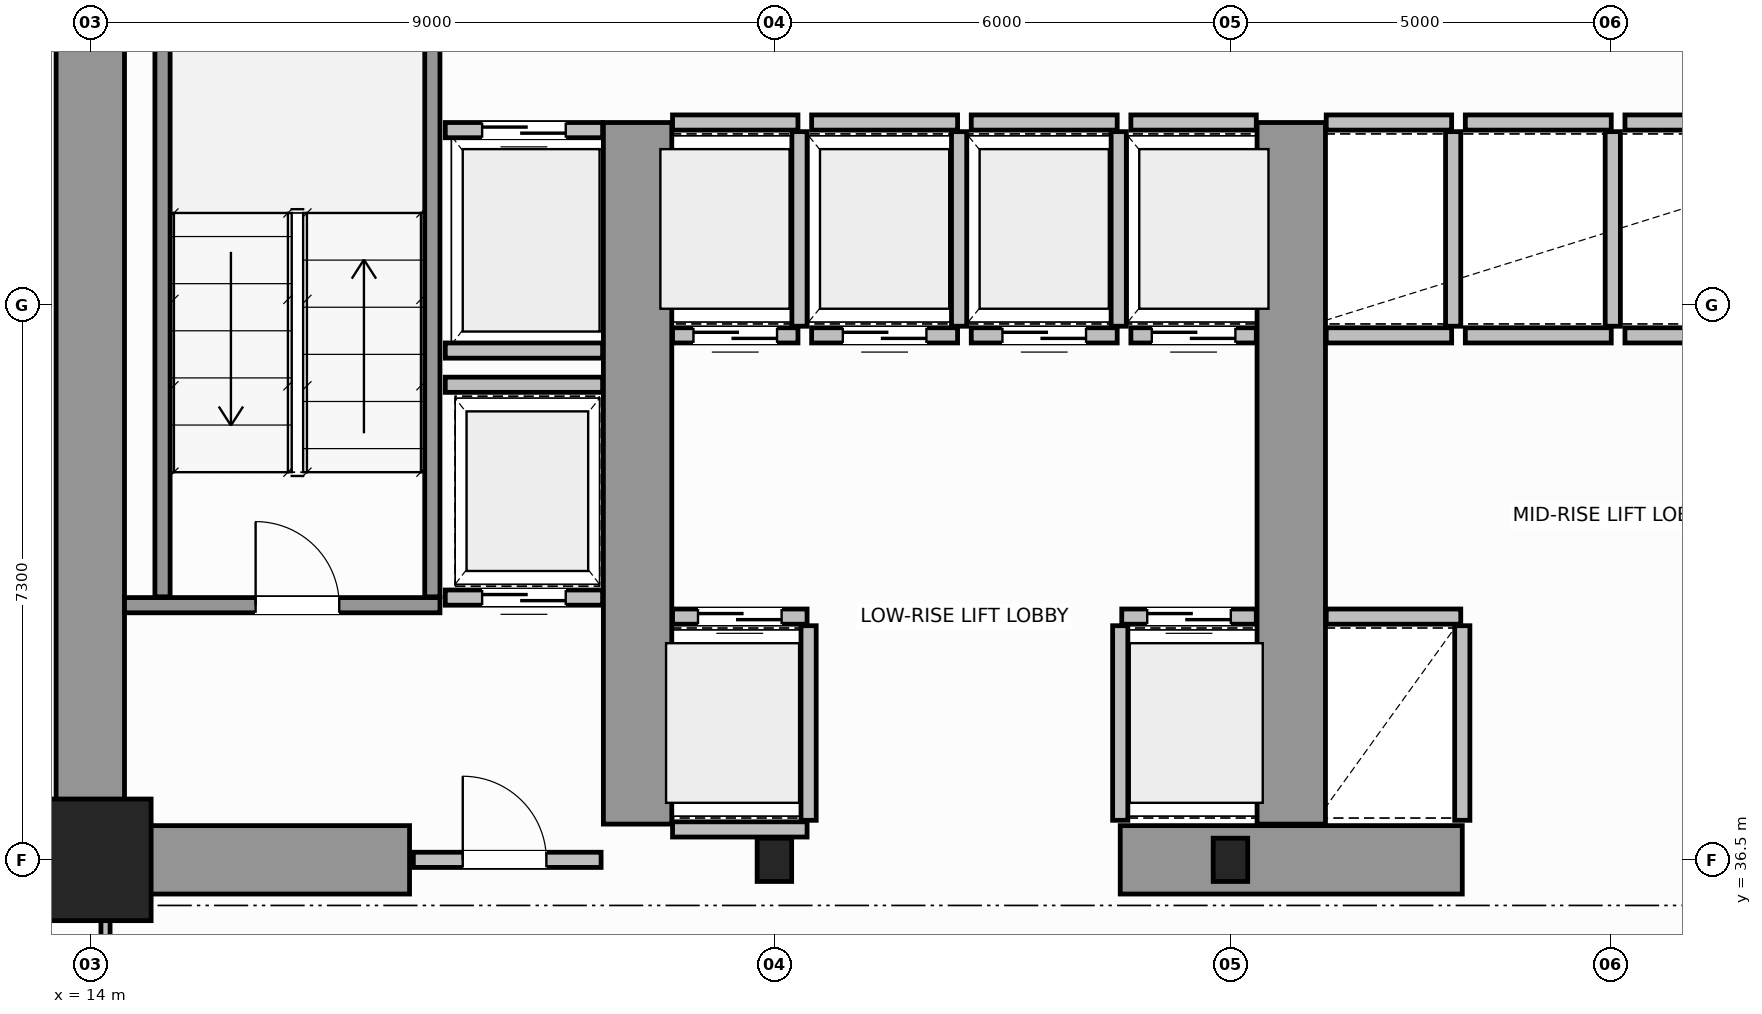
"""IFC4 building model, lengths in metres.
Left out: names, types, materials, properties, quantities, classifications, styles, units other than length and angle.
Written with IfcOpenShell. Run it as: python <this file> out.ifc"""

import sys

from ifc_helpers import new_model, si_unit, direction, frame, frame_2d, origin, origin_2d, place, context, subcontext, project, spatial, rectangle, i_section, extrude, source, transform, mapped, element, fill, save


model = new_model("IFC4")
c1 = context("Model", 3, precision=1e-05, world=origin(), true_north=direction((0.0, 1.0)))
c2 = subcontext(c1, "Body", "Model", "MODEL_VIEW")
j1 = project(units=[si_unit("LENGTHUNIT", "METRE"), si_unit("PLANEANGLEUNIT", "RADIAN")], contexts=[c1])
p1 = place(None, origin())
s1 = spatial("IfcSite", under=j1, at=p1, CompositionType="ELEMENT")
p2 = place(p1, origin())
s2 = spatial("IfcBuilding", under=s1, at=p2, CompositionType="ELEMENT")
p3 = place(p2, frame((0.0, 0.0, 49.2)))
s3 = spatial("IfcBuildingStorey", under=s2, at=p3, CompositionType="ELEMENT", Elevation=49.2)
m1 = source(origin(), c2, "Body", "SweptSolid", [
    extrude(rectangle(XDim=1.6, YDim=1.6, at=origin_2d()), origin(), (0.0, 0.0, 1.0), 3.8),
])
p4 = place(p3, frame((14.0, 36.5, 0.0), z_axis=(0.0, 0.0, 1.0), x_axis=(1.0, 0.0, 0.0)))
e1 = element("IfcColumn", 1, at=p4, inside=s3, PredefinedType="COLUMN", context=c2, shape_type="MappedRepresentation", body=[
    mapped(m1, transform((0.0, 0.0, 0.0), scale=1.0)),
])
m2 = source(origin(), c2, "Body", "SweptSolid", [
    extrude(i_section(OverallWidth=0.454, OverallDepth=0.569, WebThickness=0.078, FlangeThickness=0.08, FilletRadius=0.015, at=origin_2d()), origin(), (0.0, 0.0, 1.0), 3.8),
])
for number, where, z_axis, x_axis in (
    (2, (23.0, 36.5, 0.0), (0.0, 0.0, 1.0), (1.0, 0.0, 0.0)),
    (3, (29.0, 36.5, 0.0), (0.0, 0.0, 1.0), (1.0, 0.0, 0.0)),
):
    element("IfcColumn", number, at=place(p3, frame(where, z_axis=z_axis, x_axis=x_axis)), inside=s3, PredefinedType="COLUMN", context=c2, shape_type="MappedRepresentation", body=[
        mapped(m2, transform((0.0, 0.0, 0.0), scale=1.0)),
    ])
p5 = place(p3, frame((14.0, 36.5, 0.0), z_axis=(0.0, 0.0, 1.0), x_axis=(0.0, 1.0, 0.0)))
e4 = element("IfcWall", 4, at=p5, inside=s3, PredefinedType="SHEAR", context=c2, shape_type="SweptSolid", body=[
    extrude(rectangle(XDim=14.5, YDim=0.9, at=frame_2d((7.25, 0.0))), origin(), (0.0, 0.0, 1.0), 3.8),
])
p6 = place(p3, frame((14.47, 36.5, 0.0), z_axis=(0.0, 0.0, 1.0), x_axis=(1.0, 0.0, 0.0)))
e5 = element("IfcWall", 5, at=p6, inside=s3, PredefinedType="SHEAR", context=c2, shape_type="SweptSolid", body=[
    extrude(rectangle(XDim=3.73, YDim=0.9, at=frame_2d((1.865, 0.0))), origin(), (0.0, 0.0, 1.0), 2.38),
])
p7 = place(p3, frame((27.55, 36.5, 0.0), z_axis=(0.0, 0.0, 1.0), x_axis=(1.0, 0.0, 0.0)))
e6 = element("IfcWall", 6, at=p7, inside=s3, PredefinedType="SHEAR", context=c2, shape_type="SweptSolid", body=[
    extrude(rectangle(XDim=4.5, YDim=0.9, at=frame_2d((2.25, 0.0))), origin(), (0.0, 0.0, 1.0), 3.8),
])
for number, where, z_axis, x_axis in (
    (7, (21.2, 36.97, 0.0), (0.0, 0.0, 1.0), (0.0, 1.0, 0.0)),
    (8, (29.8, 36.97, 0.0), (0.0, 0.0, 1.0), (0.0, 1.0, 0.0)),
):
    element("IfcWall", number, at=place(p3, frame(where, z_axis=z_axis, x_axis=x_axis)), inside=s3, PredefinedType="SHEAR", context=c2, shape_type="SweptSolid", body=[
        extrude(rectangle(XDim=9.23, YDim=0.9, at=frame_2d((4.615, 0.0))), origin(), (0.0, 0.0, 1.0), 3.8),
    ])
p8 = place(p3, frame((14.45, 39.85, 0.0), z_axis=(0.0, 0.0, 1.0), x_axis=(1.0, 0.0, 0.0)))
e9 = element("IfcWall", 9, at=p8, inside=s3, PredefinedType="SOLIDWALL", context=c2, shape_type="SweptSolid", body=[
    extrude(rectangle(XDim=4.15, YDim=0.2, at=frame_2d((2.075, 0.0))), origin(), (0.0, 0.0, 1.0), 3.8),
])
p9 = place(p8, frame((1.725, 0.0, 0.0)))
e10 = element("IfcOpeningElement", 10, at=p9, cuts=e9, PredefinedType="OPENING", context=c2, shape_type="SweptSolid", body=[
    extrude(rectangle(XDim=1.1, YDim=2.15, at=frame_2d((0.55, 1.075))), frame((0.0, 0.11, 0.0), z_axis=(0.0, -1.0, 0.0), x_axis=(1.0, 0.0, 0.0)), (0.0, 0.0, 1.0), 0.22),
])
for number, where, z_axis, x_axis in (
    (11, (14.95, 39.96, 0.0), (0.0, 0.0, 1.0), (0.0, 1.0, 0.0)),
    (12, (18.5, 39.96, 0.0), (0.0, 0.0, 1.0), (0.0, 1.0, 0.0)),
):
    element("IfcWall", number, at=place(p3, frame(where, z_axis=z_axis, x_axis=x_axis)), inside=s3, PredefinedType="SOLIDWALL", context=c2, shape_type="SweptSolid", body=[
        extrude(rectangle(XDim=9.93, YDim=0.2, at=frame_2d((4.965, 0.0))), origin(), (0.0, 0.0, 1.0), 3.8),
    ])
p10 = place(p3, frame((18.25, 36.5, 0.0), z_axis=(0.0, 0.0, 1.0), x_axis=(1.0, 0.0, 0.0)))
e13 = element("IfcWall", 13, at=p10, inside=s3, PredefinedType="SOLIDWALL", context=c2, shape_type="SweptSolid", body=[
    extrude(rectangle(XDim=2.47, YDim=0.2, at=frame_2d((1.235, 0.0))), origin(), (0.0, 0.0, 1.0), 2.37),
])
p11 = place(p10, frame((0.65, 0.0, 0.0)))
e14 = element("IfcOpeningElement", 14, at=p11, cuts=e13, PredefinedType="OPENING", context=c2, shape_type="SweptSolid", body=[
    extrude(rectangle(XDim=1.1, YDim=2.15, at=frame_2d((0.55, 1.075))), frame((0.0, 0.11, 0.0), z_axis=(0.0, -1.0, 0.0), x_axis=(1.0, 0.0, 0.0)), (0.0, 0.0, 1.0), 0.22),
])
p12 = place(p3, frame((21.66, 39.7, 0.0), z_axis=(0.0, 0.0, 1.0), x_axis=(1.0, 0.0, 0.0)))
e15 = element("IfcWall", 15, at=p12, inside=s3, PredefinedType="SOLIDWALL", context=c2, shape_type="SweptSolid", body=[
    extrude(rectangle(XDim=1.77, YDim=0.2, at=frame_2d((0.885, 0.0))), origin(), (0.0, 0.0, 1.0), 3.58),
])
p13 = place(p12, frame((0.335, 0.0, 0.0)))
e16 = element("IfcOpeningElement", 16, at=p13, cuts=e15, PredefinedType="OPENING", context=c2, shape_type="SweptSolid", body=[
    extrude(rectangle(XDim=1.1, YDim=2.15, at=frame_2d((0.55, 1.075))), frame((0.0, 0.11, 0.0), z_axis=(0.0, -1.0, 0.0), x_axis=(1.0, 0.0, 0.0)), (0.0, 0.0, 1.0), 0.22),
])
p14 = place(p3, frame((21.66, 36.9, 0.0), z_axis=(0.0, 0.0, 1.0), x_axis=(1.0, 0.0, 0.0)))
e17 = element("IfcWall", 17, at=p14, inside=s3, PredefinedType="SOLIDWALL", context=c2, shape_type="SweptSolid", body=[
    extrude(rectangle(XDim=1.77, YDim=0.2, at=frame_2d((0.885, 0.0))), origin(), (0.0, 0.0, 1.0), 2.37),
])
p15 = place(p3, frame((23.45, 37.02, 0.0), z_axis=(0.0, 0.0, 1.0), x_axis=(0.0, 1.0, 0.0)))
e18 = element("IfcWall", 18, at=p15, inside=s3, PredefinedType="SOLIDWALL", context=c2, shape_type="SweptSolid", body=[
    extrude(rectangle(XDim=2.56, YDim=0.2, at=frame_2d((1.28, 0.0))), origin(), (0.0, 0.0, 1.0), 3.58),
])
p16 = place(p3, frame((27.57, 39.7, 0.0), z_axis=(0.0, 0.0, 1.0), x_axis=(1.0, 0.0, 0.0)))
e19 = element("IfcWall", 19, at=p16, inside=s3, PredefinedType="SOLIDWALL", context=c2, shape_type="SweptSolid", body=[
    extrude(rectangle(XDim=1.77, YDim=0.2, at=frame_2d((0.885, 0.0))), origin(), (0.0, 0.0, 1.0), 3.58),
])
p17 = place(p16, frame((0.335, 0.0, 0.0)))
e20 = element("IfcOpeningElement", 20, at=p17, cuts=e19, PredefinedType="OPENING", context=c2, shape_type="SweptSolid", body=[
    extrude(rectangle(XDim=1.1, YDim=2.15, at=frame_2d((0.55, 1.075))), frame((0.0, 0.11, 0.0), z_axis=(0.0, -1.0, 0.0), x_axis=(1.0, 0.0, 0.0)), (0.0, 0.0, 1.0), 0.22),
])
p18 = place(p3, frame((27.55, 37.02, 0.0), z_axis=(0.0, 0.0, 1.0), x_axis=(0.0, 1.0, 0.0)))
e21 = element("IfcWall", 21, at=p18, inside=s3, PredefinedType="SOLIDWALL", context=c2, shape_type="SweptSolid", body=[
    extrude(rectangle(XDim=2.56, YDim=0.2, at=frame_2d((1.28, 0.0))), origin(), (0.0, 0.0, 1.0), 3.58),
])
p19 = place(p3, frame((21.66, 43.4, 0.0), z_axis=(0.0, 0.0, 1.0), x_axis=(1.0, 0.0, 0.0)))
e22 = element("IfcWall", 22, at=p19, inside=s3, PredefinedType="SOLIDWALL", context=c2, shape_type="SweptSolid", body=[
    extrude(rectangle(XDim=1.65, YDim=0.2, at=frame_2d((0.825, 0.0))), origin(), (0.0, 0.0, 1.0), 3.58),
])
p20 = place(p19, frame((0.275, 0.0, 0.0)))
e23 = element("IfcOpeningElement", 23, at=p20, cuts=e22, PredefinedType="OPENING", context=c2, shape_type="SweptSolid", body=[
    extrude(rectangle(XDim=1.1, YDim=2.15, at=frame_2d((0.55, 1.075))), frame((0.0, 0.11, 0.0), z_axis=(0.0, -1.0, 0.0), x_axis=(1.0, 0.0, 0.0)), (0.0, 0.0, 1.0), 0.22),
])
p21 = place(p3, frame((21.66, 46.2, 0.0), z_axis=(0.0, 0.0, 1.0), x_axis=(1.0, 0.0, 0.0)))
e24 = element("IfcWall", 24, at=p21, inside=s3, PredefinedType="SOLIDWALL", context=c2, shape_type="SweptSolid", body=[
    extrude(rectangle(XDim=1.65, YDim=0.2, at=frame_2d((0.825, 0.0))), origin(), (0.0, 0.0, 1.0), 3.58),
])
p22 = place(p3, frame((23.33, 43.52, 0.0), z_axis=(0.0, 0.0, 1.0), x_axis=(0.0, 1.0, 0.0)))
e25 = element("IfcWall", 25, at=p22, inside=s3, PredefinedType="SOLIDWALL", context=c2, shape_type="SweptSolid", body=[
    extrude(rectangle(XDim=2.56, YDim=0.2, at=frame_2d((1.28, 0.0))), origin(), (0.0, 0.0, 1.0), 3.58),
])
p23 = place(p3, frame((23.49, 43.4, 0.0), z_axis=(0.0, 0.0, 1.0), x_axis=(1.0, 0.0, 0.0)))
e26 = element("IfcWall", 26, at=p23, inside=s3, PredefinedType="SOLIDWALL", context=c2, shape_type="SweptSolid", body=[
    extrude(rectangle(XDim=1.92, YDim=0.2, at=frame_2d((0.96, 0.0))), origin(), (0.0, 0.0, 1.0), 3.58),
])
p24 = place(p23, frame((0.41, 0.0, 0.0)))
e27 = element("IfcOpeningElement", 27, at=p24, cuts=e26, PredefinedType="OPENING", context=c2, shape_type="SweptSolid", body=[
    extrude(rectangle(XDim=1.1, YDim=2.15, at=frame_2d((0.55, 1.075))), frame((0.0, 0.11, 0.0), z_axis=(0.0, -1.0, 0.0), x_axis=(1.0, 0.0, 0.0)), (0.0, 0.0, 1.0), 0.22),
])
p25 = place(p3, frame((23.49, 46.2, 0.0), z_axis=(0.0, 0.0, 1.0), x_axis=(1.0, 0.0, 0.0)))
e28 = element("IfcWall", 28, at=p25, inside=s3, PredefinedType="SOLIDWALL", context=c2, shape_type="SweptSolid", body=[
    extrude(rectangle(XDim=1.92, YDim=0.2, at=frame_2d((0.96, 0.0))), origin(), (0.0, 0.0, 1.0), 3.58),
])
p26 = place(p3, frame((25.43, 43.52, 0.0), z_axis=(0.0, 0.0, 1.0), x_axis=(0.0, 1.0, 0.0)))
e29 = element("IfcWall", 29, at=p26, inside=s3, PredefinedType="SOLIDWALL", context=c2, shape_type="SweptSolid", body=[
    extrude(rectangle(XDim=2.56, YDim=0.2, at=frame_2d((1.28, 0.0))), origin(), (0.0, 0.0, 1.0), 3.58),
])
p27 = place(p3, frame((25.59, 43.4, 0.0), z_axis=(0.0, 0.0, 1.0), x_axis=(1.0, 0.0, 0.0)))
e30 = element("IfcWall", 30, at=p27, inside=s3, PredefinedType="SOLIDWALL", context=c2, shape_type="SweptSolid", body=[
    extrude(rectangle(XDim=1.92, YDim=0.2, at=frame_2d((0.96, 0.0))), origin(), (0.0, 0.0, 1.0), 3.58),
])
p28 = place(p27, frame((0.41, 0.0, 0.0)))
e31 = element("IfcOpeningElement", 31, at=p28, cuts=e30, PredefinedType="OPENING", context=c2, shape_type="SweptSolid", body=[
    extrude(rectangle(XDim=1.1, YDim=2.15, at=frame_2d((0.55, 1.075))), frame((0.0, 0.11, 0.0), z_axis=(0.0, -1.0, 0.0), x_axis=(1.0, 0.0, 0.0)), (0.0, 0.0, 1.0), 0.22),
])
p29 = place(p3, frame((25.59, 46.2, 0.0), z_axis=(0.0, 0.0, 1.0), x_axis=(1.0, 0.0, 0.0)))
e32 = element("IfcWall", 32, at=p29, inside=s3, PredefinedType="SOLIDWALL", context=c2, shape_type="SweptSolid", body=[
    extrude(rectangle(XDim=1.92, YDim=0.2, at=frame_2d((0.96, 0.0))), origin(), (0.0, 0.0, 1.0), 3.58),
])
p30 = place(p3, frame((27.53, 43.52, 0.0), z_axis=(0.0, 0.0, 1.0), x_axis=(0.0, 1.0, 0.0)))
e33 = element("IfcWall", 33, at=p30, inside=s3, PredefinedType="SOLIDWALL", context=c2, shape_type="SweptSolid", body=[
    extrude(rectangle(XDim=2.56, YDim=0.2, at=frame_2d((1.28, 0.0))), origin(), (0.0, 0.0, 1.0), 3.58),
])
p31 = place(p3, frame((27.69, 43.4, 0.0), z_axis=(0.0, 0.0, 1.0), x_axis=(1.0, 0.0, 0.0)))
e34 = element("IfcWall", 34, at=p31, inside=s3, PredefinedType="SOLIDWALL", context=c2, shape_type="SweptSolid", body=[
    extrude(rectangle(XDim=1.65, YDim=0.2, at=frame_2d((0.825, 0.0))), origin(), (0.0, 0.0, 1.0), 3.58),
])
p32 = place(p31, frame((0.275, 0.0, 0.0)))
e35 = element("IfcOpeningElement", 35, at=p32, cuts=e34, PredefinedType="OPENING", context=c2, shape_type="SweptSolid", body=[
    extrude(rectangle(XDim=1.1, YDim=2.15, at=frame_2d((0.55, 1.075))), frame((0.0, 0.11, 0.0), z_axis=(0.0, -1.0, 0.0), x_axis=(1.0, 0.0, 0.0)), (0.0, 0.0, 1.0), 0.22),
])
p33 = place(p3, frame((27.69, 46.2, 0.0), z_axis=(0.0, 0.0, 1.0), x_axis=(1.0, 0.0, 0.0)))
e36 = element("IfcWall", 36, at=p33, inside=s3, PredefinedType="SOLIDWALL", context=c2, shape_type="SweptSolid", body=[
    extrude(rectangle(XDim=1.65, YDim=0.2, at=frame_2d((0.825, 0.0))), origin(), (0.0, 0.0, 1.0), 3.58),
])
p34 = place(p3, frame((30.26, 39.7, 0.0), z_axis=(0.0, 0.0, 1.0), x_axis=(1.0, 0.0, 0.0)))
e37 = element("IfcWall", 37, at=p34, inside=s3, PredefinedType="SOLIDWALL", context=c2, shape_type="SweptSolid", body=[
    extrude(rectangle(XDim=1.77, YDim=0.2, at=frame_2d((0.885, 0.0))), origin(), (0.0, 0.0, 1.0), 3.58),
])
p35 = place(p3, frame((32.05, 37.02, 0.0), z_axis=(0.0, 0.0, 1.0), x_axis=(0.0, 1.0, 0.0)))
e38 = element("IfcWall", 38, at=p35, inside=s3, PredefinedType="SOLIDWALL", context=c2, shape_type="SweptSolid", body=[
    extrude(rectangle(XDim=2.56, YDim=0.2, at=frame_2d((1.28, 0.0))), origin(), (0.0, 0.0, 1.0), 3.58),
])
for number, where, z_axis, x_axis in (
    (39, (30.26, 43.4, 0.0), (0.0, 0.0, 1.0), (1.0, 0.0, 0.0)),
    (40, (30.26, 46.2, 0.0), (0.0, 0.0, 1.0), (1.0, 0.0, 0.0)),
):
    element("IfcWall", number, at=place(p3, frame(where, z_axis=z_axis, x_axis=x_axis)), inside=s3, PredefinedType="SOLIDWALL", context=c2, shape_type="SweptSolid", body=[
        extrude(rectangle(XDim=1.65, YDim=0.2, at=frame_2d((0.825, 0.0))), origin(), (0.0, 0.0, 1.0), 3.58),
    ])
p36 = place(p3, frame((31.93, 43.52, 0.0), z_axis=(0.0, 0.0, 1.0), x_axis=(0.0, 1.0, 0.0)))
e41 = element("IfcWall", 41, at=p36, inside=s3, PredefinedType="SOLIDWALL", context=c2, shape_type="SweptSolid", body=[
    extrude(rectangle(XDim=2.56, YDim=0.2, at=frame_2d((1.28, 0.0))), origin(), (0.0, 0.0, 1.0), 3.58),
])
for number, where, z_axis, x_axis in (
    (42, (32.09, 43.4, 0.0), (0.0, 0.0, 1.0), (1.0, 0.0, 0.0)),
    (43, (32.09, 46.2, 0.0), (0.0, 0.0, 1.0), (1.0, 0.0, 0.0)),
):
    element("IfcWall", number, at=place(p3, frame(where, z_axis=z_axis, x_axis=x_axis)), inside=s3, PredefinedType="SOLIDWALL", context=c2, shape_type="SweptSolid", body=[
        extrude(rectangle(XDim=1.92, YDim=0.2, at=frame_2d((0.96, 0.0))), origin(), (0.0, 0.0, 1.0), 3.58),
    ])
p37 = place(p3, frame((34.03, 43.52, 0.0), z_axis=(0.0, 0.0, 1.0), x_axis=(0.0, 1.0, 0.0)))
e44 = element("IfcWall", 44, at=p37, inside=s3, PredefinedType="SOLIDWALL", context=c2, shape_type="SweptSolid", body=[
    extrude(rectangle(XDim=2.56, YDim=0.2, at=frame_2d((1.28, 0.0))), origin(), (0.0, 0.0, 1.0), 3.58),
])
for number, where, z_axis, x_axis in (
    (45, (34.19, 43.4, 0.0), (0.0, 0.0, 1.0), (1.0, 0.0, 0.0)),
    (46, (34.19, 46.2, 0.0), (0.0, 0.0, 1.0), (1.0, 0.0, 0.0)),
):
    element("IfcWall", number, at=place(p3, frame(where, z_axis=z_axis, x_axis=x_axis)), inside=s3, PredefinedType="SOLIDWALL", context=c2, shape_type="SweptSolid", body=[
        extrude(rectangle(XDim=1.92, YDim=0.2, at=frame_2d((0.96, 0.0))), origin(), (0.0, 0.0, 1.0), 3.58),
    ])
p38 = place(p3, frame((18.67, 46.1, 0.0), z_axis=(0.0, 0.0, 1.0), x_axis=(1.0, 0.0, 0.0)))
e47 = element("IfcWall", 47, at=p38, inside=s3, PredefinedType="SOLIDWALL", context=c2, shape_type="SweptSolid", body=[
    extrude(rectangle(XDim=2.07, YDim=0.2, at=frame_2d((1.035, 0.0))), origin(), (0.0, 0.0, 1.0), 3.58),
])
p39 = place(p38, frame((0.485, 0.0, 0.0)))
e48 = element("IfcOpeningElement", 48, at=p39, cuts=e47, PredefinedType="OPENING", context=c2, shape_type="SweptSolid", body=[
    extrude(rectangle(XDim=1.1, YDim=2.15, at=frame_2d((0.55, 1.075))), frame((0.0, 0.11, 0.0), z_axis=(0.0, -1.0, 0.0), x_axis=(1.0, 0.0, 0.0)), (0.0, 0.0, 1.0), 0.22),
])
p40 = place(p3, frame((18.67, 43.2, 0.0), z_axis=(0.0, 0.0, 1.0), x_axis=(1.0, 0.0, 0.0)))
e49 = element("IfcWall", 49, at=p40, inside=s3, PredefinedType="SOLIDWALL", context=c2, shape_type="SweptSolid", body=[
    extrude(rectangle(XDim=2.07, YDim=0.2, at=frame_2d((1.035, 0.0))), origin(), (0.0, 0.0, 1.0), 3.58),
])
p41 = place(p3, frame((18.67, 39.95, 0.0), z_axis=(0.0, 0.0, 1.0), x_axis=(1.0, 0.0, 0.0)))
e50 = element("IfcWall", 50, at=p41, inside=s3, PredefinedType="SOLIDWALL", context=c2, shape_type="SweptSolid", body=[
    extrude(rectangle(XDim=2.07, YDim=0.2, at=frame_2d((1.035, 0.0))), origin(), (0.0, 0.0, 1.0), 3.58),
])
p42 = place(p41, frame((0.485, 0.0, 0.0)))
e51 = element("IfcOpeningElement", 51, at=p42, cuts=e50, PredefinedType="OPENING", context=c2, shape_type="SweptSolid", body=[
    extrude(rectangle(XDim=1.1, YDim=2.15, at=frame_2d((0.55, 1.075))), frame((0.0, 0.11, 0.0), z_axis=(0.0, -1.0, 0.0), x_axis=(1.0, 0.0, 0.0)), (0.0, 0.0, 1.0), 0.22),
])
p43 = place(p3, frame((18.67, 42.75, 0.0), z_axis=(0.0, 0.0, 1.0), x_axis=(1.0, 0.0, 0.0)))
e52 = element("IfcWall", 52, at=p43, inside=s3, PredefinedType="SOLIDWALL", context=c2, shape_type="SweptSolid", body=[
    extrude(rectangle(XDim=2.07, YDim=0.2, at=frame_2d((1.035, 0.0))), origin(), (0.0, 0.0, 1.0), 3.58),
])
p44 = place(p3, frame((14.2, 34.16, 0.0), z_axis=(0.0, 0.0, 1.0), x_axis=(0.0, 1.0, 0.0)))
e53 = element("IfcWall", 53, at=p44, inside=s3, PredefinedType="PARTITIONING", context=c2, shape_type="SweptSolid", body=[
    extrude(rectangle(XDim=2.28, YDim=0.12, at=frame_2d((1.14, 0.0))), origin(), (0.0, 0.0, 1.0), 3.58),
])
p45 = place(p44, frame((0.3, 0.0, 0.0)))
e54 = element("IfcOpeningElement", 54, at=p45, cuts=e53, PredefinedType="OPENING", context=c2, shape_type="SweptSolid", body=[
    extrude(rectangle(XDim=0.9, YDim=2.15, at=frame_2d((0.45, 1.075))), frame((0.0, 0.07, 0.0), z_axis=(0.0, -1.0, 0.0), x_axis=(1.0, 0.0, 0.0)), (0.0, 0.0, 1.0), 0.14),
])
m3 = source(origin(), c2, "Body", "SweptSolid", [
    extrude(rectangle(XDim=1.1, YDim=2.15, at=frame_2d((0.55, 1.075))), frame((0.0, 0.025, 0.0), z_axis=(0.0, -1.0, 0.0), x_axis=(1.0, 0.0, 0.0)), (0.0, 0.0, 1.0), 0.05),
])
p46 = place(p9, origin())
e55 = element("IfcDoor", 55, at=p46, inside=s3, OperationType="SINGLE_SWING_LEFT", PredefinedType="DOOR", context=c2, shape_type="MappedRepresentation", body=[
    mapped(m3, transform((0.0, 0.0, 0.0), scale=1.0)),
])
fill(e10, e55)
p47 = place(p11, origin())
e56 = element("IfcDoor", 56, at=p47, inside=s3, OperationType="SINGLE_SWING_RIGHT", PredefinedType="DOOR", context=c2, shape_type="MappedRepresentation", body=[
    mapped(m3, transform((0.0, 0.0, 0.0), scale=1.0)),
])
fill(e14, e56)
p48 = place(p13, origin())
e57 = element("IfcDoor", 57, at=p48, inside=s3, OperationType="DOUBLE_DOOR_SLIDING", PredefinedType="DOOR", context=c2, shape_type="MappedRepresentation", body=[
    mapped(m3, transform((0.0, 0.0, 0.0), scale=1.0)),
])
fill(e16, e57)
p49 = place(p17, origin())
e58 = element("IfcDoor", 58, at=p49, inside=s3, OperationType="DOUBLE_DOOR_SLIDING", PredefinedType="DOOR", context=c2, shape_type="MappedRepresentation", body=[
    mapped(m3, transform((0.0, 0.0, 0.0), scale=1.0)),
])
fill(e20, e58)
p50 = place(p20, origin())
e59 = element("IfcDoor", 59, at=p50, inside=s3, OperationType="DOUBLE_DOOR_SLIDING", PredefinedType="DOOR", context=c2, shape_type="MappedRepresentation", body=[
    mapped(m3, transform((0.0, 0.0, 0.0), scale=1.0)),
])
fill(e23, e59)
p51 = place(p24, origin())
e60 = element("IfcDoor", 60, at=p51, inside=s3, OperationType="DOUBLE_DOOR_SLIDING", PredefinedType="DOOR", context=c2, shape_type="MappedRepresentation", body=[
    mapped(m3, transform((0.0, 0.0, 0.0), scale=1.0)),
])
fill(e27, e60)
p52 = place(p28, origin())
e61 = element("IfcDoor", 61, at=p52, inside=s3, OperationType="DOUBLE_DOOR_SLIDING", PredefinedType="DOOR", context=c2, shape_type="MappedRepresentation", body=[
    mapped(m3, transform((0.0, 0.0, 0.0), scale=1.0)),
])
fill(e31, e61)
p53 = place(p32, origin())
e62 = element("IfcDoor", 62, at=p53, inside=s3, OperationType="DOUBLE_DOOR_SLIDING", PredefinedType="DOOR", context=c2, shape_type="MappedRepresentation", body=[
    mapped(m3, transform((0.0, 0.0, 0.0), scale=1.0)),
])
fill(e35, e62)
p54 = place(p39, origin())
e63 = element("IfcDoor", 63, at=p54, inside=s3, OperationType="DOUBLE_DOOR_SLIDING", PredefinedType="DOOR", context=c2, shape_type="MappedRepresentation", body=[
    mapped(m3, transform((0.0, 0.0, 0.0), scale=1.0)),
])
fill(e48, e63)
p55 = place(p42, origin())
e64 = element("IfcDoor", 64, at=p55, inside=s3, OperationType="DOUBLE_DOOR_SLIDING", PredefinedType="DOOR", context=c2, shape_type="MappedRepresentation", body=[
    mapped(m3, transform((0.0, 0.0, 0.0), scale=1.0)),
])
fill(e51, e64)
save(model, sys.argv[1])
